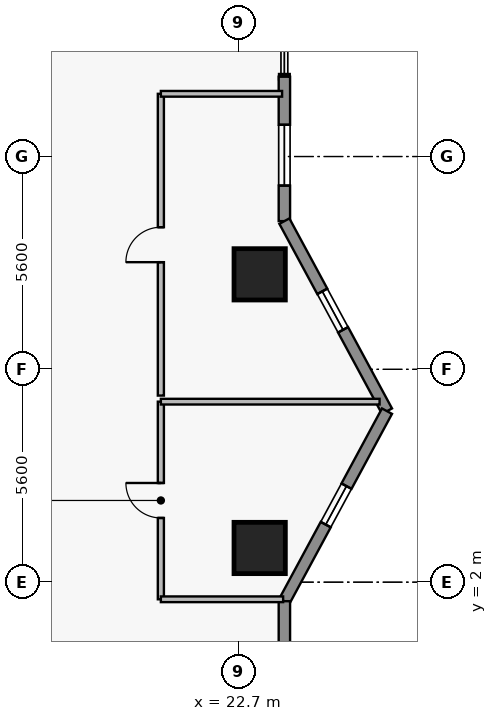
"""IFC4 building model, lengths in metres.
Left out: names, types, materials, properties, quantities, classifications, styles, units other than length and angle.
Written with IfcOpenShell. Run it as: python <this file> out.ifc"""

import sys

from ifc_helpers import new_model, si_unit, direction, frame, frame_2d, origin, origin_2d, place, context, subcontext, project, spatial, rectangle, extrude, element, fill, save


model = new_model("IFC4")
c1 = context("Model", 3, precision=1e-05, world=origin(), true_north=direction((0.0, 1.0)))
c2 = subcontext(c1, "Body", "Model", "MODEL_VIEW")
j1 = project(units=[si_unit("LENGTHUNIT", "METRE"), si_unit("PLANEANGLEUNIT", "RADIAN")], contexts=[c1])
p1 = place(None, origin())
s1 = spatial("IfcSite", under=j1, at=p1, CompositionType="ELEMENT")
p2 = place(p1, origin())
s2 = spatial("IfcBuilding", under=s1, at=p2, CompositionType="ELEMENT")
p3 = place(p2, frame((0.0, 0.0, 143.1)))
s3 = spatial("IfcBuildingStorey", under=s2, at=p3, CompositionType="ELEMENT", Elevation=143.1)
for number, where, z_axis, x_axis in (
    (1, (23.25, 2.9, 0.0), (0.0, 0.0, 1.0), (1.0, 0.0, 0.0)),
    (2, (23.25, 10.1, 0.0), (0.0, 0.0, 1.0), (1.0, 0.0, 0.0)),
):
    element("IfcColumn", number, at=place(p3, frame(where, z_axis=z_axis, x_axis=x_axis)), inside=s3, PredefinedType="COLUMN", context=c2, shape_type="SweptSolid", body=[
        extrude(rectangle(XDim=1.35, YDim=1.35, at=origin_2d()), origin(), (0.0, 0.0, 1.0), 3.65),
    ])
p4 = place(p3, frame((23.9, 15.3, 0.0), z_axis=(0.0, 0.0, 1.0), x_axis=(0.0, -1.0, 0.0)))
e3 = element("IfcWall", 3, at=p4, inside=s3, PredefinedType="STANDARD", context=c2, shape_type="SweptSolid", body=[
    extrude(rectangle(XDim=3.8, YDim=0.3, at=frame_2d((1.9, 0.0))), origin(), (0.0, 0.0, 1.0), 3.43),
])
p5 = place(p4, frame((1.265, 0.0, 0.85)))
e4 = element("IfcOpeningElement", 4, at=p5, cuts=e3, PredefinedType="OPENING", context=c2, shape_type="SweptSolid", body=[
    extrude(rectangle(XDim=1.6, YDim=1.8, at=frame_2d((0.8, 0.9))), frame((0.0, 0.16, 0.0), z_axis=(0.0, -1.0, 0.0), x_axis=(1.0, 0.0, 0.0)), (0.0, 0.0, 1.0), 0.32),
])
p6 = place(p3, frame((23.9, 11.5, 0.0), z_axis=(0.0, 0.0, 1.0), x_axis=(0.475175525499, -0.879891027325, 0.0)))
e5 = element("IfcWall", 5, at=p6, inside=s3, PredefinedType="STANDARD", context=c2, shape_type="SweptSolid", body=[
    extrude(rectangle(XDim=5.683, YDim=0.3, at=frame_2d((2.841, 0.0))), origin(), (0.0, 0.0, 1.0), 3.43),
])
p7 = place(p6, frame((2.1, 0.0, 1.25)))
e6 = element("IfcOpeningElement", 6, at=p7, cuts=e5, PredefinedType="OPENING", context=c2, shape_type="SweptSolid", body=[
    extrude(rectangle(XDim=1.15, YDim=1.55, at=frame_2d((0.575, 0.775))), frame((0.0, 0.16, 0.0), z_axis=(0.0, -1.0, 0.0), x_axis=(1.0, 0.0, 0.0)), (0.0, 0.0, 1.0), 0.32),
])
p8 = place(p3, frame((26.6, 6.5, 0.0), z_axis=(0.0, 0.0, 1.0), x_axis=(-0.475175525499, -0.879891027325, 0.0)))
e7 = element("IfcWall", 7, at=p8, inside=s3, PredefinedType="STANDARD", context=c2, shape_type="SweptSolid", body=[
    extrude(rectangle(XDim=5.683, YDim=0.3, at=frame_2d((2.841, 0.0))), origin(), (0.0, 0.0, 1.0), 3.43),
])
p9 = place(p8, frame((2.242, 0.0, 1.25)))
e8 = element("IfcOpeningElement", 8, at=p9, cuts=e7, PredefinedType="OPENING", context=c2, shape_type="SweptSolid", body=[
    extrude(rectangle(XDim=1.15, YDim=1.55, at=frame_2d((0.575, 0.775))), frame((0.0, 0.16, 0.0), z_axis=(0.0, -1.0, 0.0), x_axis=(1.0, 0.0, 0.0)), (0.0, 0.0, 1.0), 0.32),
])
p10 = place(p3, frame((23.9, 1.5, 0.0), z_axis=(0.0, 0.0, 1.0), x_axis=(0.0, -1.0, 0.0)))
e9 = element("IfcWall", 9, at=p10, inside=s3, PredefinedType="STANDARD", context=c2, shape_type="SweptSolid", body=[
    extrude(rectangle(XDim=1.15, YDim=0.3, at=frame_2d((0.575, 0.0))), origin(), (0.0, 0.0, 1.0), 3.43),
])
p11 = place(p3, frame((20.65, 1.55, 0.0), z_axis=(0.0, 0.0, 1.0), x_axis=(0.0, 1.0, 0.0)))
e10 = element("IfcWall", 10, at=p11, inside=s3, PredefinedType="PARTITIONING", context=c2, shape_type="SweptSolid", body=[
    extrude(rectangle(XDim=5.2, YDim=0.16, at=frame_2d((2.6, 0.0))), origin(), (0.0, 0.0, 1.0), 3.43),
])
p12 = place(p11, frame((2.14, 0.0, 0.0)))
e11 = element("IfcOpeningElement", 11, at=p12, cuts=e10, PredefinedType="OPENING", context=c2, shape_type="SweptSolid", body=[
    extrude(rectangle(XDim=0.92, YDim=2.12, at=frame_2d((0.46, 1.06))), frame((0.0, 0.09, 0.0), z_axis=(0.0, -1.0, 0.0), x_axis=(1.0, 0.0, 0.0)), (0.0, 0.0, 1.0), 0.18),
])
p13 = place(p3, frame((20.65, 6.91, 0.0), z_axis=(0.0, 0.0, 1.0), x_axis=(0.0, 1.0, 0.0)))
e12 = element("IfcWall", 12, at=p13, inside=s3, PredefinedType="PARTITIONING", context=c2, shape_type="SweptSolid", body=[
    extrude(rectangle(XDim=7.94, YDim=0.16, at=frame_2d((3.97, 0.0))), origin(), (0.0, 0.0, 1.0), 3.43),
])
p14 = place(p13, frame((3.51, 0.0, 0.0)))
e13 = element("IfcOpeningElement", 13, at=p14, cuts=e12, PredefinedType="OPENING", context=c2, shape_type="SweptSolid", body=[
    extrude(rectangle(XDim=0.92, YDim=2.12, at=frame_2d((0.46, 1.06))), frame((0.0, 0.09, 0.0), z_axis=(0.0, -1.0, 0.0), x_axis=(1.0, 0.0, 0.0)), (0.0, 0.0, 1.0), 0.18),
])
p15 = place(p3, frame((20.65, 1.55, 0.0), z_axis=(0.0, 0.0, 1.0), x_axis=(1.0, 0.0, 0.0)))
e14 = element("IfcWall", 14, at=p15, inside=s3, PredefinedType="PARTITIONING", context=c2, shape_type="SweptSolid", body=[
    extrude(rectangle(XDim=3.217, YDim=0.15, at=frame_2d((1.608, 0.0))), origin(), (0.0, 0.0, 1.0), 3.43),
])
p16 = place(p3, frame((20.65, 6.75, 0.0), z_axis=(0.0, 0.0, 1.0), x_axis=(1.0, 0.0, 0.0)))
e15 = element("IfcWall", 15, at=p16, inside=s3, PredefinedType="PARTITIONING", context=c2, shape_type="SweptSolid", body=[
    extrude(rectangle(XDim=5.755, YDim=0.15, at=frame_2d((2.877, 0.0))), origin(), (0.0, 0.0, 1.0), 3.43),
])
p17 = place(p3, frame((20.65, 14.85, 0.0), z_axis=(0.0, 0.0, 1.0), x_axis=(1.0, 0.0, 0.0)))
e16 = element("IfcWall", 16, at=p17, inside=s3, PredefinedType="PARTITIONING", context=c2, shape_type="SweptSolid", body=[
    extrude(rectangle(XDim=3.19, YDim=0.15, at=frame_2d((1.595, 0.0))), origin(), (0.0, 0.0, 1.0), 3.43),
])
p18 = place(p5, origin())
e17 = element("IfcWindow", 17, at=p18, inside=s3, PartitioningType="SINGLE_PANEL", PredefinedType="WINDOW", context=c2, shape_type="SweptSolid", body=[
    extrude(rectangle(XDim=1.6, YDim=1.8, at=frame_2d((0.8, 0.9))), frame((0.0, 0.03, 0.0), z_axis=(0.0, -1.0, 0.0), x_axis=(1.0, 0.0, 0.0)), (0.0, 0.0, 1.0), 0.06),
])
fill(e4, e17)
p19 = place(p7, origin())
e18 = element("IfcWindow", 18, at=p19, inside=s3, PartitioningType="SINGLE_PANEL", PredefinedType="WINDOW", context=c2, shape_type="SweptSolid", body=[
    extrude(rectangle(XDim=1.15, YDim=1.55, at=frame_2d((0.575, 0.775))), frame((0.0, 0.03, 0.0), z_axis=(0.0, -1.0, 0.0), x_axis=(1.0, 0.0, 0.0)), (0.0, 0.0, 1.0), 0.06),
])
fill(e6, e18)
p20 = place(p9, origin())
e19 = element("IfcWindow", 19, at=p20, inside=s3, PartitioningType="SINGLE_PANEL", PredefinedType="WINDOW", context=c2, shape_type="SweptSolid", body=[
    extrude(rectangle(XDim=1.15, YDim=1.55, at=frame_2d((0.575, 0.775))), frame((0.0, 0.03, 0.0), z_axis=(0.0, -1.0, 0.0), x_axis=(1.0, 0.0, 0.0)), (0.0, 0.0, 1.0), 0.06),
])
fill(e8, e19)
p21 = place(p12, origin())
e20 = element("IfcDoor", 20, at=p21, inside=s3, OperationType="SINGLE_SWING_RIGHT", PredefinedType="DOOR", context=c2, shape_type="SweptSolid", body=[
    extrude(rectangle(XDim=0.92, YDim=2.12, at=frame_2d((0.46, 1.06))), frame((0.0, 0.025, 0.0), z_axis=(0.0, -1.0, 0.0), x_axis=(1.0, 0.0, 0.0)), (0.0, 0.0, 1.0), 0.05),
])
fill(e11, e20)
p22 = place(p14, origin())
e21 = element("IfcDoor", 21, at=p22, inside=s3, OperationType="SINGLE_SWING_LEFT", PredefinedType="DOOR", context=c2, shape_type="SweptSolid", body=[
    extrude(rectangle(XDim=0.92, YDim=2.12, at=frame_2d((0.46, 1.06))), frame((0.0, 0.025, 0.0), z_axis=(0.0, -1.0, 0.0), x_axis=(1.0, 0.0, 0.0)), (0.0, 0.0, 1.0), 0.05),
])
fill(e13, e21)
save(model, sys.argv[1])
